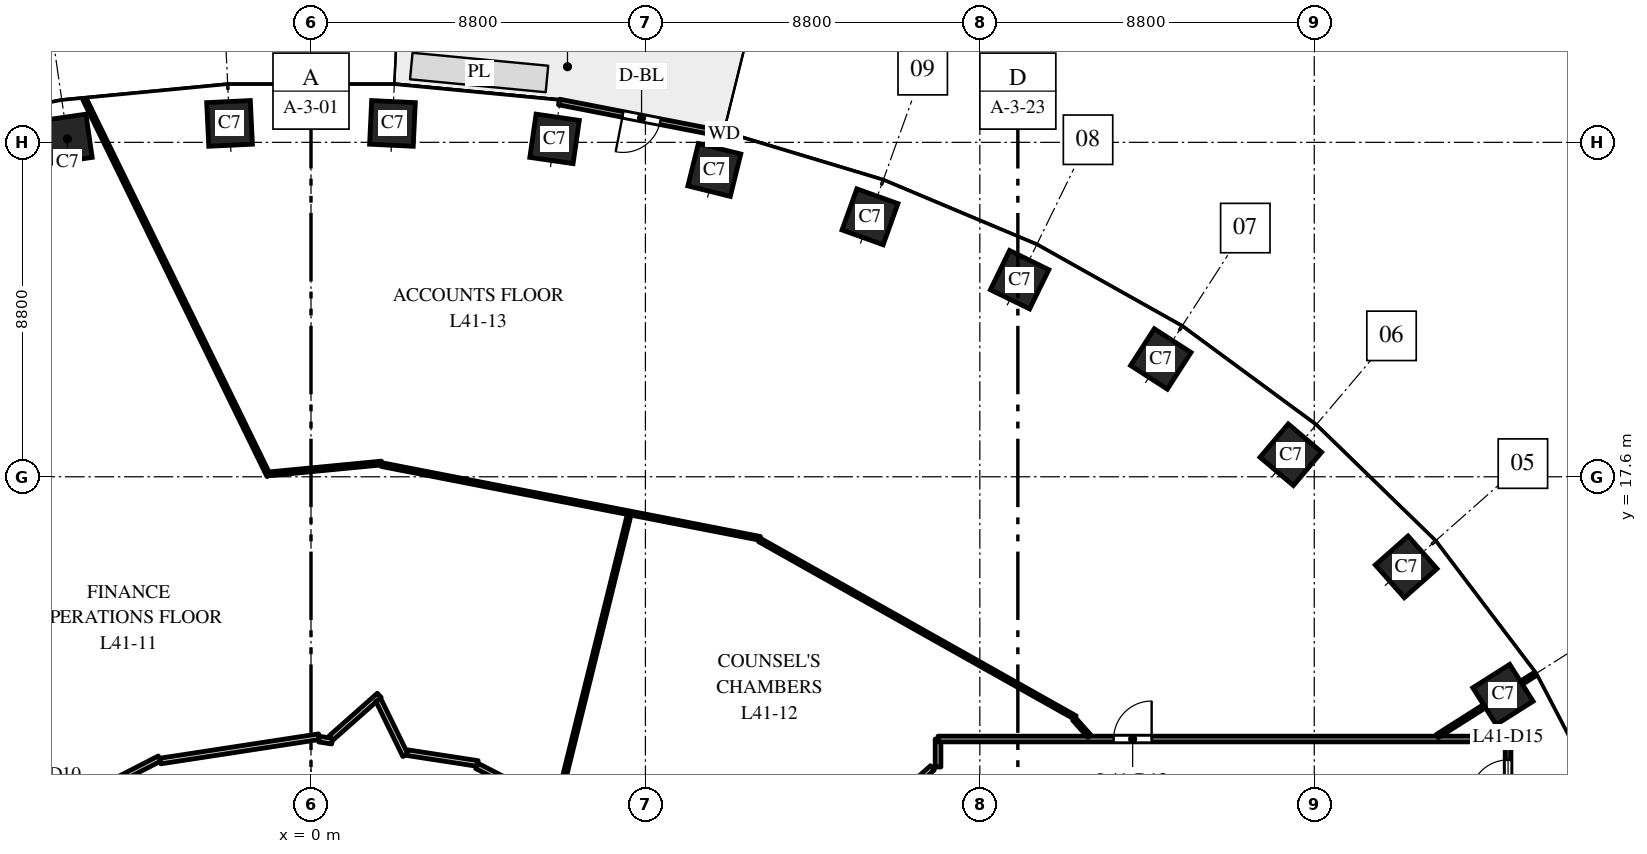
"""IFC4 building model, lengths in metres.
Left out: names, types, materials, properties, quantities, classifications, styles, units other than length and angle.
Written with IfcOpenShell. Run it as: python <this file> out.ifc"""

import sys

from ifc_helpers import new_model, si_unit, direction, frame, frame_2d, origin, origin_2d, place, context, subcontext, project, spatial, rectangle, extrude, element, fill, save


model = new_model("IFC4")
c1 = context("Model", 3, precision=1e-05, world=origin(), true_north=direction((0.0, 1.0)))
c2 = subcontext(c1, "Body", "Model", "MODEL_VIEW")
j1 = project(units=[si_unit("LENGTHUNIT", "METRE"), si_unit("PLANEANGLEUNIT", "RADIAN")], contexts=[c1])
p1 = place(None, origin())
s1 = spatial("IfcSite", under=j1, at=p1, CompositionType="ELEMENT")
p2 = place(p1, origin())
s2 = spatial("IfcBuilding", under=s1, at=p2, CompositionType="ELEMENT")
p3 = place(p2, frame((0.0, 0.0, 178.0)))
s3 = spatial("IfcBuildingStorey", under=s2, at=p3, CompositionType="ELEMENT", Elevation=178.0)
for number, where, z_axis, x_axis in (
    (1, (31.365, 11.871, 0.0), (0.0, 0.0, 1.0), (-0.535, 0.845, 0.0)),
    (2, (28.819, 15.23, 0.0), (0.0, 0.0, 1.0), (-0.663, 0.749, 0.0)),
    (3, (25.783, 18.18, 0.0), (0.0, 0.0, 1.0), (-0.763, 0.646, 0.0)),
    (4, (22.362, 20.7, 0.0), (0.0, 0.0, 1.0), (-0.84, 0.542, 0.0)),
    (5, (18.646, 22.785, 0.0), (0.0, 0.0, 1.0), (-0.898, 0.439, 0.0)),
    (6, (14.709, 24.441, 0.0), (0.0, 0.0, 1.0), (-0.941, 0.338, 0.0)),
    (7, (10.613, 25.674, 0.0), (0.0, 0.0, 1.0), (-0.971, 0.24, 0.0)),
    (8, (6.409, 26.491, 0.0), (0.0, 0.0, 1.0), (-0.99, 0.143, 0.0)),
    (9, (2.143, 26.898, 0.0), (0.0, 0.0, 1.0), (-0.999, 0.048, 0.0)),
    (10, (-2.143, 26.898, 0.0), (0.0, 0.0, 1.0), (-0.999, -0.048, 0.0)),
    (11, (-6.409, 26.491, 0.0), (0.0, 0.0, 1.0), (-0.99, -0.143, 0.0)),
):
    element("IfcColumn", number, at=place(p3, frame(where, z_axis=z_axis, x_axis=x_axis)), inside=s3, PredefinedType="COLUMN", context=c2, shape_type="SweptSolid", body=[
        extrude(rectangle(XDim=1.15, YDim=1.15, at=origin_2d()), origin(), (0.0, 0.0, 1.0), 4.0),
    ])
p4 = place(p3, frame((10.871, 26.617, 0.0), z_axis=(0.0, 0.0, 1.0), x_axis=(-0.981631174778, 0.190788460615, 0.0)))
e12 = element("IfcWall", 12, at=p4, inside=s3, PredefinedType="STANDARD", context=c2, shape_type="SweptSolid", body=[
    extrude(rectangle(XDim=4.426, YDim=0.15, at=frame_2d((2.213, 0.0))), origin(), (0.0, 0.0, 1.0), 3.7),
])
p5 = place(p4, frame((1.713, 0.0, 0.0)))
e13 = element("IfcOpeningElement", 13, at=p5, cuts=e12, PredefinedType="OPENING", context=c2, shape_type="SweptSolid", body=[
    extrude(rectangle(XDim=1.0, YDim=2.4, at=frame_2d((0.5, 1.2))), frame((0.0, 0.085, 0.0), z_axis=(0.0, -1.0, 0.0), x_axis=(1.0, 0.0, 0.0)), (0.0, 0.0, 1.0), 0.17),
])
p6 = place(p3, frame((-7.859, 8.196, 0.0), z_axis=(0.0, 0.0, 1.0), x_axis=(0.889405670308, 0.457118752213, 0.0)))
e14 = element("IfcWall", 14, at=p6, inside=s3, PredefinedType="PARTITIONING", context=c2, shape_type="SweptSolid", body=[
    extrude(rectangle(XDim=4.355, YDim=0.15, at=frame_2d((2.178, 0.0))), origin(), (0.0, 0.0, 1.0), 2.85),
])
p7 = place(p6, frame((0.491, 0.0, 0.0)))
e15 = element("IfcOpeningElement", 15, at=p7, cuts=e14, PredefinedType="OPENING", context=c2, shape_type="SweptSolid", body=[
    extrude(rectangle(XDim=1.0, YDim=2.1, at=frame_2d((0.5, 1.05))), frame((0.0, 0.085, 0.0), z_axis=(0.0, -1.0, 0.0), x_axis=(1.0, 0.0, 0.0)), (0.0, 0.0, 1.0), 0.17),
])
p8 = place(p3, frame((-5.958, 27.538, 0.0), z_axis=(0.0, 0.0, 1.0), x_axis=(0.439175599961, -0.89840124243, 0.0)))
e16 = element("IfcWall", 16, at=p8, inside=s3, PredefinedType="PARTITIONING", context=c2, shape_type="SweptSolid", body=[
    extrude(rectangle(XDim=11.032, YDim=0.1, at=frame_2d((5.516, 0.0))), origin(), (0.0, 0.0, 1.0), 2.85),
])
p9 = place(p3, frame((-3.964, 10.121, 0.0), z_axis=(0.0, 0.0, 1.0), x_axis=(0.988463044045, 0.151462241359, 0.0)))
e17 = element("IfcWall", 17, at=p9, inside=s3, PredefinedType="PARTITIONING", context=c2, shape_type="SweptSolid", body=[
    extrude(rectangle(XDim=4.225, YDim=0.15, at=frame_2d((2.112, 0.0))), origin(), (0.0, 0.0, 1.0), 2.85),
])
p10 = place(p3, frame((-1.083, 17.68, 0.0), z_axis=(0.0, 0.0, 1.0), x_axis=(0.995437741406, 0.095413327081, 0.0)))
e18 = element("IfcWall", 18, at=p10, inside=s3, PredefinedType="PARTITIONING", context=c2, shape_type="SweptSolid", body=[
    extrude(rectangle(XDim=2.955, YDim=0.1, at=frame_2d((1.478, 0.0))), origin(), (0.0, 0.0, 1.0), 3.7),
])
p11 = place(p3, frame((0.212, 10.697, 0.0), z_axis=(0.0, 0.0, 1.0), x_axis=(0.988347357149, -0.152215313344, 0.0)))
e19 = element("IfcWall", 19, at=p11, inside=s3, PredefinedType="PARTITIONING", context=c2, shape_type="SweptSolid", body=[
    extrude(rectangle(XDim=0.348, YDim=0.15, at=frame_2d((0.174, 0.0))), origin(), (0.0, 0.0, 1.0), 3.7),
])
p12 = place(p3, frame((0.526, 10.725, 0.0), z_axis=(0.0, 0.0, 1.0), x_axis=(0.748837178436, 0.662754011826, 0.0)))
e20 = element("IfcWall", 20, at=p12, inside=s3, PredefinedType="PARTITIONING", context=c2, shape_type="SweptSolid", body=[
    extrude(rectangle(XDim=1.696, YDim=0.15, at=frame_2d((0.848, 0.0))), origin(), (0.0, 0.0, 1.0), 3.7),
])
p13 = place(p3, frame((1.857, 17.921, 0.0), z_axis=(0.0, 0.0, 1.0), x_axis=(0.98153666983, -0.191274059348, 0.0)))
e21 = element("IfcWall", 21, at=p13, inside=s3, PredefinedType="PARTITIONING", context=c2, shape_type="SweptSolid", body=[
    extrude(rectangle(XDim=10.147, YDim=0.1, at=frame_2d((5.074, 0.0))), origin(), (0.0, 0.0, 1.0), 2.85),
])
p14 = place(p3, frame((1.772, 11.727, 0.0), z_axis=(0.0, 0.0, 1.0), x_axis=(0.439231774218, -0.898373779959, 0.0)))
e22 = element("IfcWall", 22, at=p14, inside=s3, PredefinedType="PARTITIONING", context=c2, shape_type="SweptSolid", body=[
    extrude(rectangle(XDim=1.619, YDim=0.15, at=frame_2d((0.809, 0.0))), origin(), (0.0, 0.0, 1.0), 2.85),
])
p15 = place(p3, frame((2.526, 10.342, 0.0), z_axis=(0.0, 0.0, 1.0), x_axis=(0.988398649241, -0.151881895491, 0.0)))
e23 = element("IfcWall", 23, at=p15, inside=s3, PredefinedType="PARTITIONING", context=c2, shape_type="SweptSolid", body=[
    extrude(rectangle(XDim=1.884, YDim=0.15, at=frame_2d((0.942, 0.0))), origin(), (0.0, 0.0, 1.0), 2.85),
])
p16 = place(p3, frame((4.367, 9.991, 0.0), z_axis=(0.0, 0.0, 1.0), x_axis=(0.889480321924, -0.456973475061, 0.0)))
e24 = element("IfcWall", 24, at=p16, inside=s3, PredefinedType="PARTITIONING", context=c2, shape_type="SweptSolid", body=[
    extrude(rectangle(XDim=4.331, YDim=0.15, at=frame_2d((2.165, 0.0))), origin(), (0.0, 0.0, 1.0), 2.85),
])
p17 = place(p3, frame((6.491, 8.988, 0.0), z_axis=(0.0, 0.0, 1.0), x_axis=(0.239904638237, 0.970796458869, 0.0)))
e25 = element("IfcWall", 25, at=p17, inside=s3, PredefinedType="PARTITIONING", context=c2, shape_type="SweptSolid", body=[
    extrude(rectangle(XDim=7.841, YDim=0.1, at=frame_2d((3.92, 0.0))), origin(), (0.0, 0.0, 1.0), 2.85),
])
p18 = place(p3, frame((11.802, 15.937, 0.0), z_axis=(0.0, 0.0, 1.0), x_axis=(0.871652836429, -0.490123793286, 0.0)))
e26 = element("IfcWall", 26, at=p18, inside=s3, PredefinedType="PARTITIONING", context=c2, shape_type="SweptSolid", body=[
    extrude(rectangle(XDim=9.53, YDim=0.1, at=frame_2d((4.765, 0.0))), origin(), (0.0, 0.0, 1.0), 3.7),
])
p19 = place(p3, frame((16.5, 9.964, 0.0), z_axis=(0.0, 0.0, 1.0), x_axis=(0.0, 1.0, 0.0)))
e27 = element("IfcWall", 27, at=p19, inside=s3, PredefinedType="PARTITIONING", context=c2, shape_type="SweptSolid", body=[
    extrude(rectangle(XDim=0.736, YDim=0.15, at=frame_2d((0.368, 0.0))), origin(), (0.0, 0.0, 1.0), 3.7),
])
p20 = place(p3, frame((16.5, 10.7, 0.0), z_axis=(0.0, 0.0, 1.0), x_axis=(1.0, 0.0, 0.0)))
e28 = element("IfcWall", 28, at=p20, inside=s3, PredefinedType="PARTITIONING", context=c2, shape_type="SweptSolid", body=[
    extrude(rectangle(XDim=15.0, YDim=0.15, at=frame_2d((7.5, 0.0))), origin(), (0.0, 0.0, 1.0), 2.75),
])
p21 = place(p20, frame((4.621, 0.0, 0.0)))
e29 = element("IfcOpeningElement", 29, at=p21, cuts=e28, PredefinedType="OPENING", context=c2, shape_type="SweptSolid", body=[
    extrude(rectangle(XDim=1.0, YDim=2.1, at=frame_2d((0.5, 1.05))), frame((0.0, 0.085, 0.0), z_axis=(0.0, -1.0, 0.0), x_axis=(1.0, 0.0, 0.0)), (0.0, 0.0, 1.0), 0.17),
])
p22 = place(p3, frame((20.079, 11.229, 0.0), z_axis=(0.0, 0.0, 1.0), x_axis=(0.663614598559, -0.748074638375, 0.0)))
e30 = element("IfcWall", 30, at=p22, inside=s3, PredefinedType="PARTITIONING", context=c2, shape_type="SweptSolid", body=[
    extrude(rectangle(XDim=0.607, YDim=0.1, at=frame_2d((0.303, 0.0))), origin(), (0.0, 0.0, 1.0), 2.75),
])
p23 = place(p3, frame((29.637, 10.777, 0.0), z_axis=(0.0, 0.0, 1.0), x_axis=(0.844810627195, 0.535065420467, 0.0)))
e31 = element("IfcWall", 31, at=p23, inside=s3, PredefinedType="PARTITIONING", context=c2, shape_type="SweptSolid", body=[
    extrude(rectangle(XDim=3.048, YDim=0.1, at=frame_2d((1.524, 0.0))), origin(), (0.0, 0.0, 1.0), 2.9),
])
p24 = place(p3, frame((31.5, 8.5, 0.0), z_axis=(0.0, 0.0, 1.0), x_axis=(0.0, 1.0, 0.0)))
e32 = element("IfcWall", 32, at=p24, inside=s3, PredefinedType="PARTITIONING", context=c2, shape_type="SweptSolid", body=[
    extrude(rectangle(XDim=2.2, YDim=0.15, at=frame_2d((1.1, 0.0))), origin(), (0.0, 0.0, 1.0), 2.9),
])
p25 = place(p24, frame((0.65, 0.0, 0.0)))
e33 = element("IfcOpeningElement", 33, at=p25, cuts=e32, PredefinedType="OPENING", context=c2, shape_type="SweptSolid", body=[
    extrude(rectangle(XDim=1.0, YDim=2.1, at=frame_2d((0.5, 1.05))), frame((0.0, 0.085, 0.0), z_axis=(0.0, -1.0, 0.0), x_axis=(1.0, 0.0, 0.0)), (0.0, 0.0, 1.0), 0.17),
])
p26 = place(p3, frame((15.087, 8.819, 0.0), z_axis=(0.0, 0.0, 1.0), x_axis=(0.747926695066, 0.663781333579, 0.0)))
e34 = element("IfcWall", 34, at=p26, inside=s3, PredefinedType="PARTITIONING", context=c2, shape_type="SweptSolid", body=[
    extrude(rectangle(XDim=1.691, YDim=0.15, at=frame_2d((0.846, 0.0))), origin(), (0.0, 0.0, 1.0), 3.7),
])
p27 = place(p5, origin())
e35 = element("IfcDoor", 35, at=p27, inside=s3, OperationType="SINGLE_SWING_RIGHT", PredefinedType="DOOR", context=c2, shape_type="SweptSolid", body=[
    extrude(rectangle(XDim=1.0, YDim=2.4, at=frame_2d((0.5, 1.2))), frame((0.0, 0.025, 0.0), z_axis=(0.0, -1.0, 0.0), x_axis=(1.0, 0.0, 0.0)), (0.0, 0.0, 1.0), 0.05),
])
fill(e13, e35)
p28 = place(p21, origin())
e36 = element("IfcDoor", 36, at=p28, inside=s3, OperationType="SINGLE_SWING_RIGHT", PredefinedType="DOOR", context=c2, shape_type="SweptSolid", body=[
    extrude(rectangle(XDim=1.0, YDim=2.1, at=frame_2d((0.5, 1.05))), frame((0.0, 0.025, 0.0), z_axis=(0.0, -1.0, 0.0), x_axis=(1.0, 0.0, 0.0)), (0.0, 0.0, 1.0), 0.05),
])
fill(e29, e36)
p29 = place(p25, origin())
e37 = element("IfcDoor", 37, at=p29, inside=s3, OperationType="SINGLE_SWING_LEFT", PredefinedType="DOOR", context=c2, shape_type="SweptSolid", body=[
    extrude(rectangle(XDim=1.0, YDim=2.1, at=frame_2d((0.5, 1.05))), frame((0.0, 0.025, 0.0), z_axis=(0.0, -1.0, 0.0), x_axis=(1.0, 0.0, 0.0)), (0.0, 0.0, 1.0), 0.05),
])
fill(e33, e37)
save(model, sys.argv[1])
